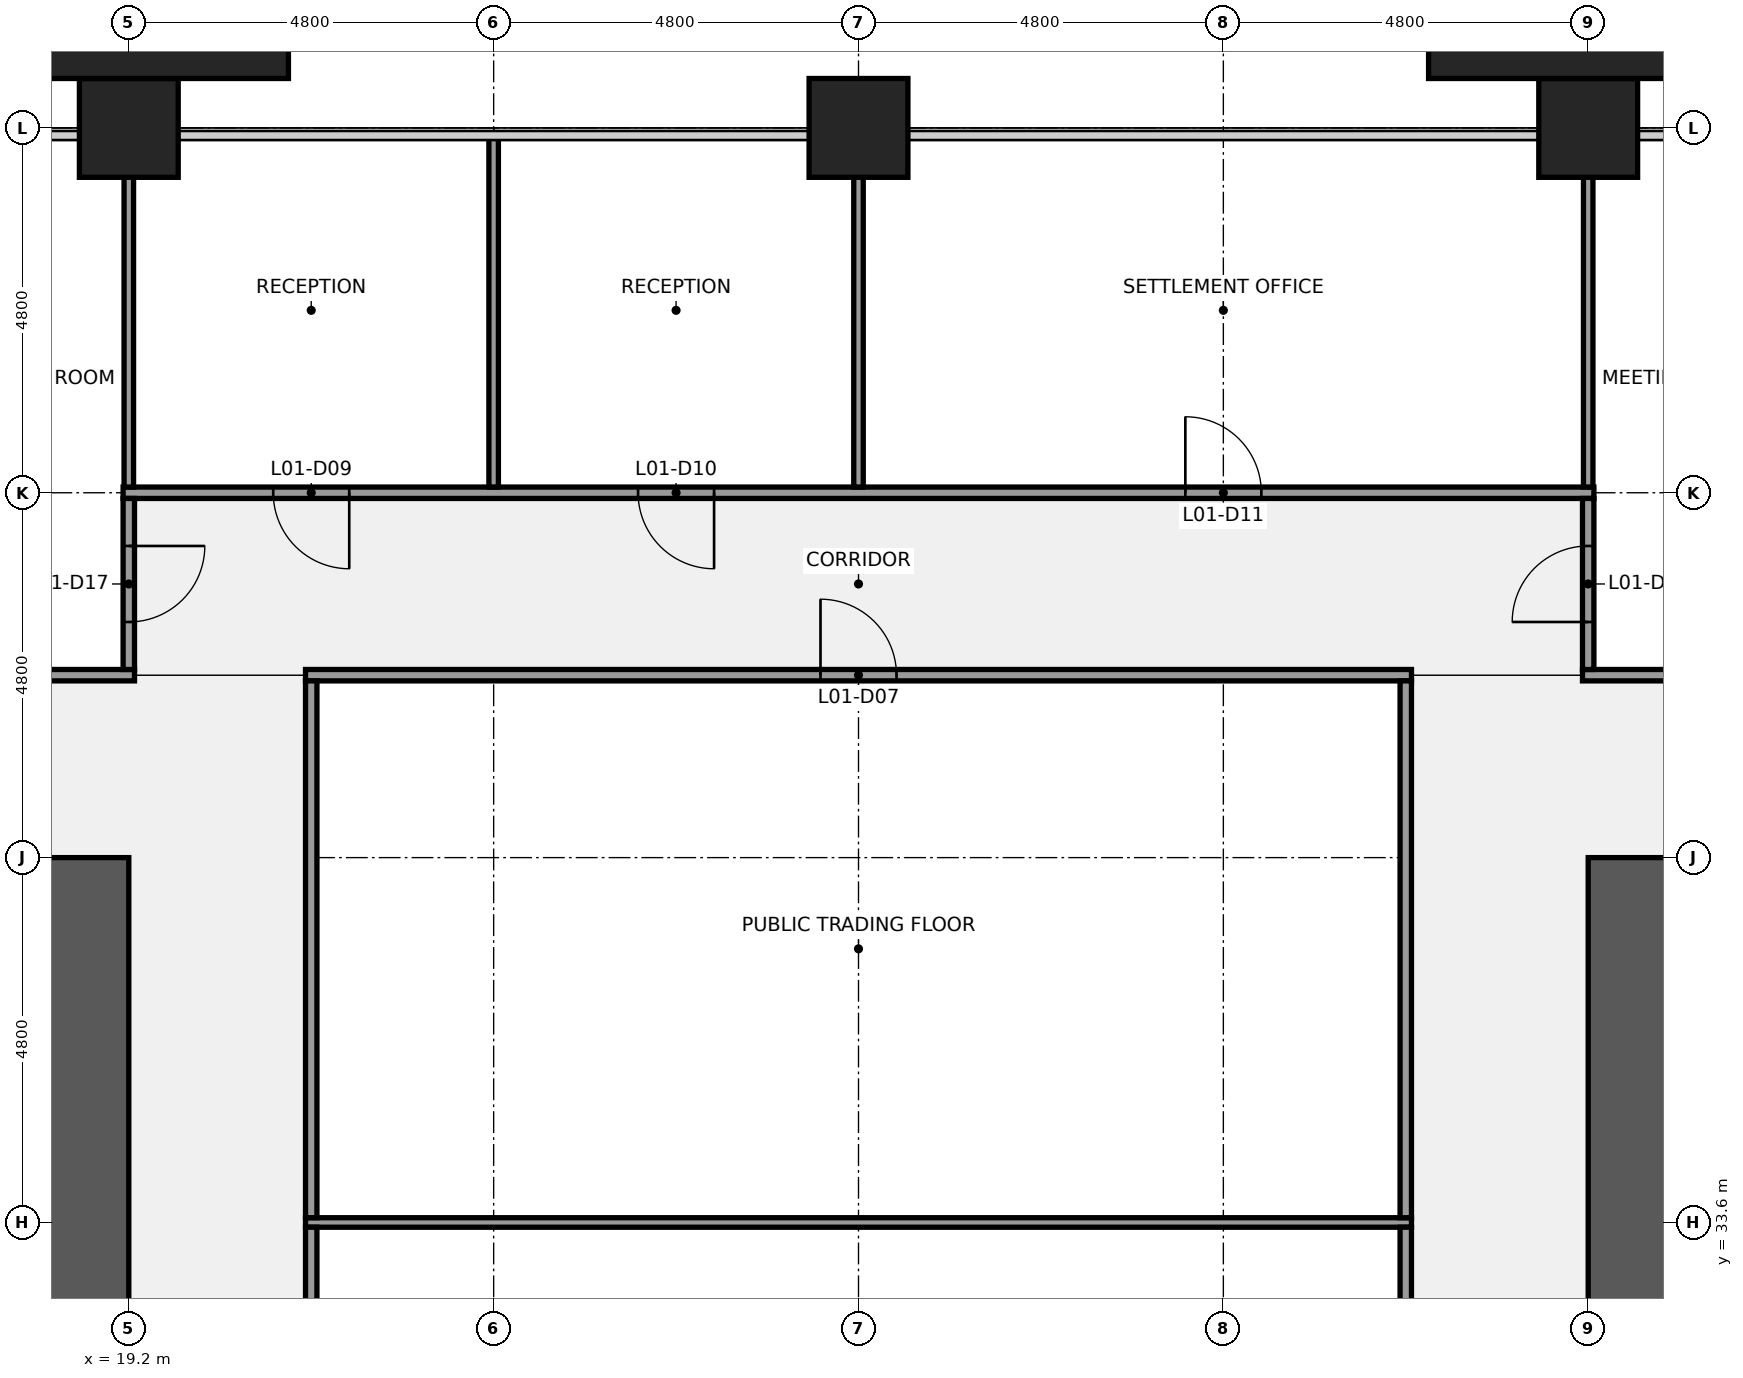
"""IFC4 building model, lengths in metres.
Left out: names, types, materials, properties, quantities, classifications, styles, units other than length and angle.
Written with IfcOpenShell. Run it as: python <this file> out.ifc"""

import sys

from ifc_helpers import new_model, si_unit, direction, frame, frame_2d, origin, origin_2d, place, context, subcontext, project, spatial, rectangle, extrude, element, fill, save


model = new_model("IFC4")
c1 = context("Model", 3, precision=1e-05, world=origin(), true_north=direction((0.0, 1.0)))
c2 = subcontext(c1, "Body", "Model", "MODEL_VIEW")
j1 = project(units=[si_unit("LENGTHUNIT", "METRE"), si_unit("PLANEANGLEUNIT", "RADIAN")], contexts=[c1])
p1 = place(None, origin())
s1 = spatial("IfcSite", under=j1, at=p1, CompositionType="ELEMENT")
p2 = place(p1, origin())
s2 = spatial("IfcBuilding", under=s1, at=p2, CompositionType="ELEMENT")
p3 = place(p2, frame((0.0, 0.0, 12.6)))
s3 = spatial("IfcBuildingStorey", under=s2, at=p3, CompositionType="ELEMENT", Elevation=12.6)
for number, where, z_axis, x_axis in (
    (1, (19.2, 48.0, 0.0), (0.0, 0.0, 1.0), (1.0, 0.0, 0.0)),
    (2, (28.8, 48.0, 0.0), (0.0, 0.0, 1.0), (1.0, 0.0, 0.0)),
    (3, (38.4, 48.0, 0.0), (0.0, 0.0, 1.0), (1.0, 0.0, 0.0)),
):
    element("IfcColumn", number, at=place(p3, frame(where, z_axis=z_axis, x_axis=x_axis)), inside=s3, PredefinedType="COLUMN", context=c2, shape_type="SweptSolid", body=[
        extrude(rectangle(XDim=1.3, YDim=1.3, at=origin_2d()), origin(), (0.0, 0.0, 1.0), 4.4),
    ])
p4 = place(p3, frame((18.6, 38.4, 0.0), z_axis=(0.0, 0.0, 1.0), x_axis=(0.0, -1.0, 0.0)))
e4 = element("IfcWall", 4, at=p4, inside=s3, PredefinedType="SHEAR", context=c2, shape_type="SweptSolid", body=[
    extrude(rectangle(XDim=28.8, YDim=1.2, at=frame_2d((14.4, 0.0))), origin(), (0.0, 0.0, 1.0), 4.24),
])
p5 = place(p4, frame((18.3, 0.0, 0.0)))
e5 = element("IfcOpeningElement", 5, at=p5, cuts=e4, PredefinedType="OPENING", context=c2, shape_type="SweptSolid", body=[
    extrude(rectangle(XDim=1.8, YDim=2.1, at=frame_2d((0.9, 1.05))), frame((0.0, 0.61, 0.0), z_axis=(0.0, -1.0, 0.0), x_axis=(1.0, 0.0, 0.0)), (0.0, 0.0, 1.0), 1.22),
])
p6 = place(p4, frame((8.7, 0.0, 0.0)))
e6 = element("IfcOpeningElement", 6, at=p6, cuts=e4, PredefinedType="OPENING", context=c2, shape_type="SweptSolid", body=[
    extrude(rectangle(XDim=1.8, YDim=2.1, at=frame_2d((0.9, 1.05))), frame((0.0, 0.61, 0.0), z_axis=(0.0, -1.0, 0.0), x_axis=(1.0, 0.0, 0.0)), (0.0, 0.0, 1.0), 1.22),
])
p7 = place(p3, frame((39.0, 9.6, 0.0), z_axis=(0.0, 0.0, 1.0), x_axis=(0.0, 1.0, 0.0)))
e7 = element("IfcWall", 7, at=p7, inside=s3, PredefinedType="SHEAR", context=c2, shape_type="SweptSolid", body=[
    extrude(rectangle(XDim=28.8, YDim=1.2, at=frame_2d((14.4, 0.0))), origin(), (0.0, 0.0, 1.0), 4.24),
])
p8 = place(p7, frame((8.7, 0.0, 0.0)))
e8 = element("IfcOpeningElement", 8, at=p8, cuts=e7, PredefinedType="OPENING", context=c2, shape_type="SweptSolid", body=[
    extrude(rectangle(XDim=1.8, YDim=2.1, at=frame_2d((0.9, 1.05))), frame((0.0, 0.61, 0.0), z_axis=(0.0, -1.0, 0.0), x_axis=(1.0, 0.0, 0.0)), (0.0, 0.0, 1.0), 1.22),
])
p9 = place(p7, frame((18.3, 0.0, 0.0)))
e9 = element("IfcOpeningElement", 9, at=p9, cuts=e7, PredefinedType="OPENING", context=c2, shape_type="SweptSolid", body=[
    extrude(rectangle(XDim=1.8, YDim=2.1, at=frame_2d((0.9, 1.05))), frame((0.0, 0.61, 0.0), z_axis=(0.0, -1.0, 0.0), x_axis=(1.0, 0.0, 0.0)), (0.0, 0.0, 1.0), 1.22),
])
p10 = place(p3, frame((21.525, 33.6, 0.0), z_axis=(0.0, 0.0, 1.0), x_axis=(1.0, 0.0, 0.0)))
e10 = element("IfcWall", 10, at=p10, inside=s3, PredefinedType="PARTITIONING", context=c2, shape_type="SweptSolid", body=[
    extrude(rectangle(XDim=14.55, YDim=0.125, at=frame_2d((7.275, 0.0))), origin(), (0.0, 0.0, 1.0), 3.27),
])
p11 = place(p3, frame((9.525, 40.8, 0.0), z_axis=(0.0, 0.0, 1.0), x_axis=(1.0, 0.0, 0.0)))
e11 = element("IfcWall", 11, at=p11, inside=s3, PredefinedType="PARTITIONING", context=c2, shape_type="SweptSolid", body=[
    extrude(rectangle(XDim=9.75, YDim=0.15, at=frame_2d((4.875, 0.0))), origin(), (0.0, 0.0, 1.0), 3.27),
])
p12 = place(p11, frame((3.175, 0.0, 0.0)))
e12 = element("IfcOpeningElement", 12, at=p12, cuts=e11, PredefinedType="OPENING", context=c2, shape_type="SweptSolid", body=[
    extrude(rectangle(XDim=1.0, YDim=2.1, at=frame_2d((0.5, 1.05))), frame((0.0, 0.085, 0.0), z_axis=(0.0, -1.0, 0.0), x_axis=(1.0, 0.0, 0.0)), (0.0, 0.0, 1.0), 0.17),
])
p13 = place(p3, frame((21.525, 40.8, 0.0), z_axis=(0.0, 0.0, 1.0), x_axis=(1.0, 0.0, 0.0)))
e13 = element("IfcWall", 13, at=p13, inside=s3, PredefinedType="PARTITIONING", context=c2, shape_type="SweptSolid", body=[
    extrude(rectangle(XDim=14.55, YDim=0.15, at=frame_2d((7.275, 0.0))), origin(), (0.0, 0.0, 1.0), 3.27),
])
p14 = place(p13, frame((6.775, 0.0, 0.0)))
e14 = element("IfcOpeningElement", 14, at=p14, cuts=e13, PredefinedType="OPENING", context=c2, shape_type="SweptSolid", body=[
    extrude(rectangle(XDim=1.0, YDim=2.1, at=frame_2d((0.5, 1.05))), frame((0.0, 0.085, 0.0), z_axis=(0.0, -1.0, 0.0), x_axis=(1.0, 0.0, 0.0)), (0.0, 0.0, 1.0), 0.17),
])
p15 = place(p3, frame((38.325, 40.8, 0.0), z_axis=(0.0, 0.0, 1.0), x_axis=(1.0, 0.0, 0.0)))
e15 = element("IfcWall", 15, at=p15, inside=s3, PredefinedType="PARTITIONING", context=c2, shape_type="SweptSolid", body=[
    extrude(rectangle(XDim=9.75, YDim=0.15, at=frame_2d((4.875, 0.0))), origin(), (0.0, 0.0, 1.0), 3.27),
])
p16 = place(p15, frame((5.575, 0.0, 0.0)))
e16 = element("IfcOpeningElement", 16, at=p16, cuts=e15, PredefinedType="OPENING", context=c2, shape_type="SweptSolid", body=[
    extrude(rectangle(XDim=1.0, YDim=2.1, at=frame_2d((0.5, 1.05))), frame((0.0, 0.085, 0.0), z_axis=(0.0, -1.0, 0.0), x_axis=(1.0, 0.0, 0.0)), (0.0, 0.0, 1.0), 0.17),
])
p17 = place(p3, frame((19.125, 43.2, 0.0), z_axis=(0.0, 0.0, 1.0), x_axis=(1.0, 0.0, 0.0)))
e17 = element("IfcWall", 17, at=p17, inside=s3, PredefinedType="PARTITIONING", context=c2, shape_type="SweptSolid", body=[
    extrude(rectangle(XDim=19.35, YDim=0.15, at=frame_2d((9.675, 0.0))), origin(), (0.0, 0.0, 1.0), 3.27),
])
p18 = place(p17, frame((1.975, 0.0, 0.0)))
e18 = element("IfcOpeningElement", 18, at=p18, cuts=e17, PredefinedType="OPENING", context=c2, shape_type="SweptSolid", body=[
    extrude(rectangle(XDim=1.0, YDim=2.1, at=frame_2d((0.5, 1.05))), frame((0.0, 0.085, 0.0), z_axis=(0.0, -1.0, 0.0), x_axis=(1.0, 0.0, 0.0)), (0.0, 0.0, 1.0), 0.17),
])
p19 = place(p17, frame((6.775, 0.0, 0.0)))
e19 = element("IfcOpeningElement", 19, at=p19, cuts=e17, PredefinedType="OPENING", context=c2, shape_type="SweptSolid", body=[
    extrude(rectangle(XDim=1.0, YDim=2.1, at=frame_2d((0.5, 1.05))), frame((0.0, 0.085, 0.0), z_axis=(0.0, -1.0, 0.0), x_axis=(1.0, 0.0, 0.0)), (0.0, 0.0, 1.0), 0.17),
])
p20 = place(p17, frame((13.975, 0.0, 0.0)))
e20 = element("IfcOpeningElement", 20, at=p20, cuts=e17, PredefinedType="OPENING", context=c2, shape_type="SweptSolid", body=[
    extrude(rectangle(XDim=1.0, YDim=2.1, at=frame_2d((0.5, 1.05))), frame((0.0, 0.085, 0.0), z_axis=(0.0, -1.0, 0.0), x_axis=(1.0, 0.0, 0.0)), (0.0, 0.0, 1.0), 0.17),
])
p21 = place(p3, frame((19.2, 43.275, 0.0), z_axis=(0.0, 0.0, 1.0), x_axis=(0.0, 1.0, 0.0)))
e21 = element("IfcWall", 21, at=p21, inside=s3, PredefinedType="PARTITIONING", context=c2, shape_type="SweptSolid", body=[
    extrude(rectangle(XDim=4.075, YDim=0.125, at=frame_2d((2.038, 0.0))), origin(), (0.0, 0.0, 1.0), 3.27),
])
p22 = place(p3, frame((19.2, 40.875, 0.0), z_axis=(0.0, 0.0, 1.0), x_axis=(0.0, 1.0, 0.0)))
e22 = element("IfcWall", 22, at=p22, inside=s3, PredefinedType="PARTITIONING", context=c2, shape_type="SweptSolid", body=[
    extrude(rectangle(XDim=2.25, YDim=0.15, at=frame_2d((1.125, 0.0))), origin(), (0.0, 0.0, 1.0), 3.27),
])
p23 = place(p22, frame((0.625, 0.0, 0.0)))
e23 = element("IfcOpeningElement", 23, at=p23, cuts=e22, PredefinedType="OPENING", context=c2, shape_type="SweptSolid", body=[
    extrude(rectangle(XDim=1.0, YDim=2.1, at=frame_2d((0.5, 1.05))), frame((0.0, 0.085, 0.0), z_axis=(0.0, -1.0, 0.0), x_axis=(1.0, 0.0, 0.0)), (0.0, 0.0, 1.0), 0.17),
])
p24 = place(p3, frame((21.6, 24.062, 0.0), z_axis=(0.0, 0.0, 1.0), x_axis=(0.0, 1.0, 0.0)))
e24 = element("IfcWall", 24, at=p24, inside=s3, PredefinedType="PARTITIONING", context=c2, shape_type="SweptSolid", body=[
    extrude(rectangle(XDim=9.475, YDim=0.15, at=frame_2d((4.738, 0.0))), origin(), (0.0, 0.0, 1.0), 3.27),
])
p25 = place(p24, frame((4.238, 0.0, 0.0)))
e25 = element("IfcOpeningElement", 25, at=p25, cuts=e24, PredefinedType="OPENING", context=c2, shape_type="SweptSolid", body=[
    extrude(rectangle(XDim=1.0, YDim=2.1, at=frame_2d((0.5, 1.05))), frame((0.0, 0.085, 0.0), z_axis=(0.0, -1.0, 0.0), x_axis=(1.0, 0.0, 0.0)), (0.0, 0.0, 1.0), 0.17),
])
p26 = place(p3, frame((21.6, 33.663, 0.0), z_axis=(0.0, 0.0, 1.0), x_axis=(0.0, 1.0, 0.0)))
e26 = element("IfcWall", 26, at=p26, inside=s3, PredefinedType="PARTITIONING", context=c2, shape_type="SweptSolid", body=[
    extrude(rectangle(XDim=7.062, YDim=0.15, at=frame_2d((3.531, 0.0))), origin(), (0.0, 0.0, 1.0), 3.27),
])
p27 = place(p3, frame((24.0, 43.275, 0.0), z_axis=(0.0, 0.0, 1.0), x_axis=(0.0, 1.0, 0.0)))
e27 = element("IfcWall", 27, at=p27, inside=s3, PredefinedType="PARTITIONING", context=c2, shape_type="SweptSolid", body=[
    extrude(rectangle(XDim=4.625, YDim=0.125, at=frame_2d((2.312, 0.0))), origin(), (0.0, 0.0, 1.0), 3.27),
])
p28 = place(p3, frame((28.8, 43.275, 0.0), z_axis=(0.0, 0.0, 1.0), x_axis=(0.0, 1.0, 0.0)))
e28 = element("IfcWall", 28, at=p28, inside=s3, PredefinedType="PARTITIONING", context=c2, shape_type="SweptSolid", body=[
    extrude(rectangle(XDim=4.075, YDim=0.125, at=frame_2d((2.038, 0.0))), origin(), (0.0, 0.0, 1.0), 3.27),
])
p29 = place(p3, frame((36.0, 24.062, 0.0), z_axis=(0.0, 0.0, 1.0), x_axis=(0.0, 1.0, 0.0)))
e29 = element("IfcWall", 29, at=p29, inside=s3, PredefinedType="PARTITIONING", context=c2, shape_type="SweptSolid", body=[
    extrude(rectangle(XDim=9.475, YDim=0.15, at=frame_2d((4.738, 0.0))), origin(), (0.0, 0.0, 1.0), 3.27),
])
p30 = place(p3, frame((36.0, 33.663, 0.0), z_axis=(0.0, 0.0, 1.0), x_axis=(0.0, 1.0, 0.0)))
e30 = element("IfcWall", 30, at=p30, inside=s3, PredefinedType="PARTITIONING", context=c2, shape_type="SweptSolid", body=[
    extrude(rectangle(XDim=7.062, YDim=0.15, at=frame_2d((3.531, 0.0))), origin(), (0.0, 0.0, 1.0), 3.27),
])
p31 = place(p3, frame((38.4, 43.275, 0.0), z_axis=(0.0, 0.0, 1.0), x_axis=(0.0, 1.0, 0.0)))
e31 = element("IfcWall", 31, at=p31, inside=s3, PredefinedType="PARTITIONING", context=c2, shape_type="SweptSolid", body=[
    extrude(rectangle(XDim=4.075, YDim=0.125, at=frame_2d((2.038, 0.0))), origin(), (0.0, 0.0, 1.0), 3.27),
])
p32 = place(p3, frame((38.4, 40.875, 0.0), z_axis=(0.0, 0.0, 1.0), x_axis=(0.0, 1.0, 0.0)))
e32 = element("IfcWall", 32, at=p32, inside=s3, PredefinedType="PARTITIONING", context=c2, shape_type="SweptSolid", body=[
    extrude(rectangle(XDim=2.25, YDim=0.15, at=frame_2d((1.125, 0.0))), origin(), (0.0, 0.0, 1.0), 3.27),
])
p33 = place(p32, frame((0.625, 0.0, 0.0)))
e33 = element("IfcOpeningElement", 33, at=p33, cuts=e32, PredefinedType="OPENING", context=c2, shape_type="SweptSolid", body=[
    extrude(rectangle(XDim=1.0, YDim=2.1, at=frame_2d((0.5, 1.05))), frame((0.0, 0.085, 0.0), z_axis=(0.0, -1.0, 0.0), x_axis=(1.0, 0.0, 0.0)), (0.0, 0.0, 1.0), 0.17),
])
for number, where, z_axis, x_axis in (
    (34, (19.2, 49.075, 0.0), (0.0, 0.0, 1.0), (1.0, 0.0, 0.0)),
    (35, (38.4, 49.075, 0.0), (0.0, 0.0, 1.0), (1.0, 0.0, 0.0)),
):
    element("IfcColumn", number, at=place(p3, frame(where, z_axis=z_axis, x_axis=x_axis)), inside=s3, PredefinedType="PILASTER", context=c2, shape_type="SweptSolid", body=[
        extrude(rectangle(XDim=4.2, YDim=0.85, at=origin_2d()), origin(), (0.0, 0.0, 1.0), 4.4),
    ])
p34 = place(p14, origin())
e36 = element("IfcDoor", 36, at=p34, inside=s3, OperationType="SINGLE_SWING_LEFT", PredefinedType="DOOR", context=c2, shape_type="SweptSolid", body=[
    extrude(rectangle(XDim=1.0, YDim=2.1, at=frame_2d((0.5, 1.05))), frame((0.0, 0.025, 0.0), z_axis=(0.0, -1.0, 0.0), x_axis=(1.0, 0.0, 0.0)), (0.0, 0.0, 1.0), 0.05),
])
fill(e14, e36)
p35 = place(p18, origin())
e37 = element("IfcDoor", 37, at=p35, inside=s3, OperationType="SINGLE_SWING_RIGHT", PredefinedType="DOOR", context=c2, shape_type="SweptSolid", body=[
    extrude(rectangle(XDim=1.0, YDim=2.1, at=frame_2d((0.5, 1.05))), frame((0.0, 0.025, 0.0), z_axis=(0.0, -1.0, 0.0), x_axis=(1.0, 0.0, 0.0)), (0.0, 0.0, 1.0), 0.05),
])
fill(e18, e37)
p36 = place(p19, origin())
e38 = element("IfcDoor", 38, at=p36, inside=s3, OperationType="SINGLE_SWING_RIGHT", PredefinedType="DOOR", context=c2, shape_type="SweptSolid", body=[
    extrude(rectangle(XDim=1.0, YDim=2.1, at=frame_2d((0.5, 1.05))), frame((0.0, 0.025, 0.0), z_axis=(0.0, -1.0, 0.0), x_axis=(1.0, 0.0, 0.0)), (0.0, 0.0, 1.0), 0.05),
])
fill(e19, e38)
p37 = place(p20, origin())
e39 = element("IfcDoor", 39, at=p37, inside=s3, OperationType="SINGLE_SWING_LEFT", PredefinedType="DOOR", context=c2, shape_type="SweptSolid", body=[
    extrude(rectangle(XDim=1.0, YDim=2.1, at=frame_2d((0.5, 1.05))), frame((0.0, 0.025, 0.0), z_axis=(0.0, -1.0, 0.0), x_axis=(1.0, 0.0, 0.0)), (0.0, 0.0, 1.0), 0.05),
])
fill(e20, e39)
p38 = place(p23, origin())
e40 = element("IfcDoor", 40, at=p38, inside=s3, OperationType="SINGLE_SWING_RIGHT", PredefinedType="DOOR", context=c2, shape_type="SweptSolid", body=[
    extrude(rectangle(XDim=1.0, YDim=2.1, at=frame_2d((0.5, 1.05))), frame((0.0, 0.025, 0.0), z_axis=(0.0, -1.0, 0.0), x_axis=(1.0, 0.0, 0.0)), (0.0, 0.0, 1.0), 0.05),
])
fill(e23, e40)
p39 = place(p33, origin())
e41 = element("IfcDoor", 41, at=p39, inside=s3, OperationType="SINGLE_SWING_LEFT", PredefinedType="DOOR", context=c2, shape_type="SweptSolid", body=[
    extrude(rectangle(XDim=1.0, YDim=2.1, at=frame_2d((0.5, 1.05))), frame((0.0, 0.025, 0.0), z_axis=(0.0, -1.0, 0.0), x_axis=(1.0, 0.0, 0.0)), (0.0, 0.0, 1.0), 0.05),
])
fill(e33, e41)
save(model, sys.argv[1])
